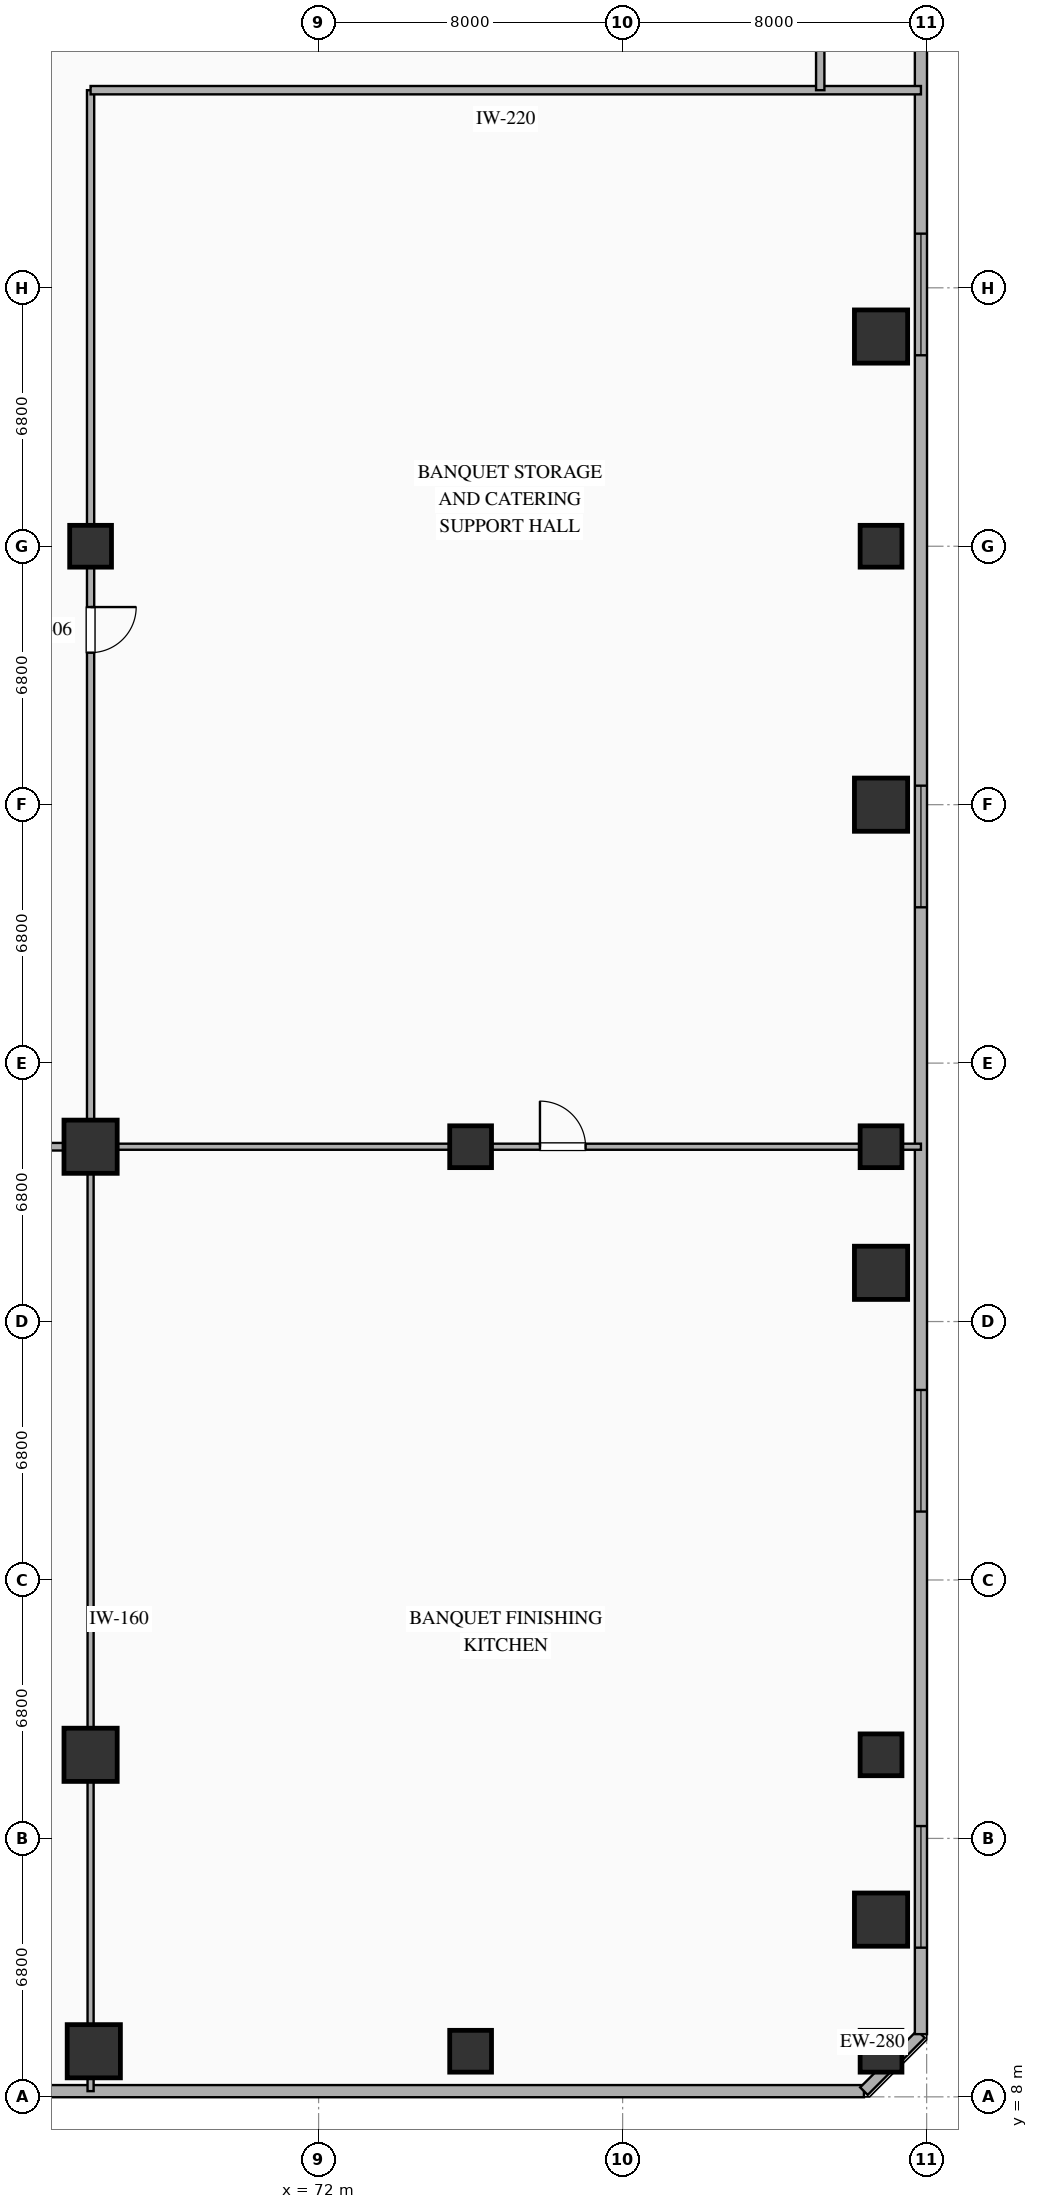
"""IFC4 building model, lengths in metres.
Left out: names, types, materials, properties, quantities, classifications, styles, units other than length and angle.
Written with IfcOpenShell. Run it as: python <this file> out.ifc"""

import sys

from ifc_helpers import new_model, si_unit, direction, frame, frame_2d, origin, origin_2d, place, context, subcontext, project, spatial, rectangle, extrude, element, fill, save


model = new_model("IFC4")
c1 = context("Model", 3, precision=1e-05, world=origin(), true_north=direction((0.0, 1.0)))
c2 = subcontext(c1, "Body", "Model", "MODEL_VIEW")
j1 = project(units=[si_unit("LENGTHUNIT", "METRE"), si_unit("PLANEANGLEUNIT", "RADIAN")], contexts=[c1])
p1 = place(None, origin())
s1 = spatial("IfcSite", under=j1, at=p1, CompositionType="ELEMENT")
p2 = place(p1, origin())
s2 = spatial("IfcBuilding", under=s1, at=p2, CompositionType="ELEMENT")
p3 = place(p2, frame((0.0, 0.0, 16.8)))
s3 = spatial("IfcBuildingStorey", under=s2, at=p3, CompositionType="ELEMENT", Elevation=16.8)
for number, where, z_axis, x_axis in (
    (1, (76.0, 9.2, 0.0), (0.0, 0.0, 1.0), (1.0, 0.0, 0.0)),
    (2, (86.8, 9.2, 0.0), (0.0, 0.0, 1.0), (1.0, 0.0, 0.0)),
    (3, (86.8, 17.0, 0.0), (0.0, 0.0, 1.0), (1.0, 0.0, 0.0)),
    (4, (86.8, 33.0, 0.0), (0.0, 0.0, 1.0), (1.0, 0.0, 0.0)),
    (5, (86.8, 48.8, 0.0), (0.0, 0.0, 1.0), (1.0, 0.0, 0.0)),
):
    element("IfcColumn", number, at=place(p3, frame(where, z_axis=z_axis, x_axis=x_axis)), inside=s3, PredefinedType="COLUMN", context=c2, shape_type="SweptSolid", body=[
        extrude(rectangle(XDim=1.1, YDim=1.1, at=origin_2d()), origin(), (0.0, 0.0, 1.0), 5.05),
    ])
for number, where, z_axis, x_axis in (
    (6, (66.0, 17.0, 0.0), (0.0, 0.0, 1.0), (1.0, 0.0, 0.0)),
    (7, (66.0, 33.0, 0.0), (0.0, 0.0, 1.0), (1.0, 0.0, 0.0)),
):
    element("IfcColumn", number, at=place(p3, frame(where, z_axis=z_axis, x_axis=x_axis)), inside=s3, PredefinedType="COLUMN", context=c2, shape_type="SweptSolid", body=[
        extrude(rectangle(XDim=1.4, YDim=1.4, at=origin_2d()), origin(), (0.0, 0.0, 1.0), 5.05),
    ])
for number, where, z_axis, x_axis in (
    (8, (76.0, 33.0, 0.0), (0.0, 0.0, 1.0), (1.0, 0.0, 0.0)),
    (9, (66.0, 48.8, 0.0), (0.0, 0.0, 1.0), (1.0, 0.0, 0.0)),
):
    element("IfcColumn", number, at=place(p3, frame(where, z_axis=z_axis, x_axis=x_axis)), inside=s3, PredefinedType="COLUMN", context=c2, shape_type="SweptSolid", body=[
        extrude(rectangle(XDim=1.1, YDim=1.1, at=origin_2d()), origin(), (0.0, 0.0, 1.0), 5.05),
    ])
for number, where, z_axis, x_axis in (
    (10, (86.8, 42.0, 0.0), (0.0, 0.0, 1.0), (1.0, 0.0, 0.0)),
    (11, (86.8, 54.318, 0.0), (0.0, 0.0, 1.0), (1.0, 0.0, 0.0)),
    (12, (66.084, 9.2, 0.0), (0.0, 0.0, 1.0), (1.0, 0.0, 0.0)),
    (13, (86.8, 12.663, 0.0), (0.0, 0.0, 1.0), (1.0, 0.0, 0.0)),
    (14, (86.8, 29.682, 0.0), (0.0, 0.0, 1.0), (1.0, 0.0, 0.0)),
):
    element("IfcColumn", number, at=place(p3, frame(where, z_axis=z_axis, x_axis=x_axis)), inside=s3, PredefinedType="COLUMN", context=c2, shape_type="SweptSolid", body=[
        extrude(rectangle(XDim=1.4, YDim=1.4, at=origin_2d()), origin(), (0.0, 0.0, 1.0), 5.05),
    ])
p4 = place(p3, frame((9.65, 8.15, 0.0), z_axis=(0.0, 0.0, 1.0), x_axis=(1.0, 0.0, 0.0)))
e15 = element("IfcWall", 15, at=p4, inside=s3, PredefinedType="SOLIDWALL", context=c2, shape_type="SweptSolid", body=[
    extrude(rectangle(XDim=76.7, YDim=0.32, at=frame_2d((38.35, 0.0))), origin(), (0.0, 0.0, 1.0), 5.05),
])
p5 = place(p4, frame((3.775, 0.0, 0.9)))
e16 = element("IfcOpeningElement", 16, at=p5, cuts=e15, PredefinedType="OPENING", context=c2, shape_type="SweptSolid", body=[
    extrude(rectangle(XDim=3.2, YDim=3.95, at=frame_2d((1.6, 1.975))), frame((0.0, 0.17, 0.0), z_axis=(0.0, -1.0, 0.0), x_axis=(1.0, 0.0, 0.0)), (0.0, 0.0, 1.0), 0.34),
])
p6 = place(p4, frame((13.75, 0.0, 0.9)))
e17 = element("IfcOpeningElement", 17, at=p6, cuts=e15, PredefinedType="OPENING", context=c2, shape_type="SweptSolid", body=[
    extrude(rectangle(XDim=3.2, YDim=3.95, at=frame_2d((1.6, 1.975))), frame((0.0, 0.17, 0.0), z_axis=(0.0, -1.0, 0.0), x_axis=(1.0, 0.0, 0.0)), (0.0, 0.0, 1.0), 0.34),
])
p7 = place(p4, frame((24.75, 0.0, 0.9)))
e18 = element("IfcOpeningElement", 18, at=p7, cuts=e15, PredefinedType="OPENING", context=c2, shape_type="SweptSolid", body=[
    extrude(rectangle(XDim=3.2, YDim=3.95, at=frame_2d((1.6, 1.975))), frame((0.0, 0.17, 0.0), z_axis=(0.0, -1.0, 0.0), x_axis=(1.0, 0.0, 0.0)), (0.0, 0.0, 1.0), 0.34),
])
p8 = place(p4, frame((36.75, 0.0, 0.9)))
e19 = element("IfcOpeningElement", 19, at=p8, cuts=e15, PredefinedType="OPENING", context=c2, shape_type="SweptSolid", body=[
    extrude(rectangle(XDim=3.2, YDim=3.95, at=frame_2d((1.6, 1.975))), frame((0.0, 0.17, 0.0), z_axis=(0.0, -1.0, 0.0), x_axis=(1.0, 0.0, 0.0)), (0.0, 0.0, 1.0), 0.34),
])
p9 = place(p3, frame((86.35, 8.15, 0.0), z_axis=(0.0, 0.0, 1.0), x_axis=(0.707106781187, 0.707106781187, 0.0)))
e20 = element("IfcWall", 20, at=p9, inside=s3, PredefinedType="SOLIDWALL", context=c2, shape_type="SweptSolid", body=[
    extrude(rectangle(XDim=2.121, YDim=0.28, at=frame_2d((1.061, 0.0))), origin(), (0.0, 0.0, 1.0), 5.05),
])
p10 = place(p3, frame((87.85, 9.65, 0.0), z_axis=(0.0, 0.0, 1.0), x_axis=(0.0, 1.0, 0.0)))
e21 = element("IfcWall", 21, at=p10, inside=s3, PredefinedType="SOLIDWALL", context=c2, shape_type="SweptSolid", body=[
    extrude(rectangle(XDim=64.7, YDim=0.32, at=frame_2d((32.35, 0.0))), origin(), (0.0, 0.0, 1.0), 5.05),
])
p11 = place(p10, frame((2.275, 0.0, 0.9)))
e22 = element("IfcOpeningElement", 22, at=p11, cuts=e21, PredefinedType="OPENING", context=c2, shape_type="SweptSolid", body=[
    extrude(rectangle(XDim=3.2, YDim=3.95, at=frame_2d((1.6, 1.975))), frame((0.0, 0.17, 0.0), z_axis=(0.0, -1.0, 0.0), x_axis=(1.0, 0.0, 0.0)), (0.0, 0.0, 1.0), 0.34),
])
p12 = place(p10, frame((13.75, 0.0, 0.9)))
e23 = element("IfcOpeningElement", 23, at=p12, cuts=e21, PredefinedType="OPENING", context=c2, shape_type="SweptSolid", body=[
    extrude(rectangle(XDim=3.2, YDim=3.95, at=frame_2d((1.6, 1.975))), frame((0.0, 0.17, 0.0), z_axis=(0.0, -1.0, 0.0), x_axis=(1.0, 0.0, 0.0)), (0.0, 0.0, 1.0), 0.34),
])
p13 = place(p10, frame((29.65, 0.0, 0.9)))
e24 = element("IfcOpeningElement", 24, at=p13, cuts=e21, PredefinedType="OPENING", context=c2, shape_type="SweptSolid", body=[
    extrude(rectangle(XDim=3.2, YDim=3.95, at=frame_2d((1.6, 1.975))), frame((0.0, 0.17, 0.0), z_axis=(0.0, -1.0, 0.0), x_axis=(1.0, 0.0, 0.0)), (0.0, 0.0, 1.0), 0.34),
])
p14 = place(p10, frame((44.175, 0.0, 0.9)))
e25 = element("IfcOpeningElement", 25, at=p14, cuts=e21, PredefinedType="OPENING", context=c2, shape_type="SweptSolid", body=[
    extrude(rectangle(XDim=3.2, YDim=3.95, at=frame_2d((1.6, 1.975))), frame((0.0, 0.17, 0.0), z_axis=(0.0, -1.0, 0.0), x_axis=(1.0, 0.0, 0.0)), (0.0, 0.0, 1.0), 0.34),
])
p15 = place(p3, frame((66.0, 33.0, 0.0), z_axis=(0.0, 0.0, 1.0), x_axis=(-1.0, 0.0, 0.0)))
e26 = element("IfcWall", 26, at=p15, inside=s3, PredefinedType="PARTITIONING", context=c2, shape_type="SweptSolid", body=[
    extrude(rectangle(XDim=57.85, YDim=0.2, at=frame_2d((28.925, 0.0))), origin(), (0.0, 0.0, 1.0), 3.65),
])
p16 = place(p15, frame((17.416, 0.0, 0.0)))
e27 = element("IfcOpeningElement", 27, at=p16, cuts=e26, PredefinedType="OPENING", context=c2, shape_type="SweptSolid", body=[
    extrude(rectangle(XDim=1.2, YDim=2.25, at=frame_2d((0.6, 1.125))), frame((0.0, 0.11, 0.0), z_axis=(0.0, -1.0, 0.0), x_axis=(1.0, 0.0, 0.0)), (0.0, 0.0, 1.0), 0.22),
])
p17 = place(p15, frame((41.684, 0.0, 0.0)))
e28 = element("IfcOpeningElement", 28, at=p17, cuts=e26, PredefinedType="OPENING", context=c2, shape_type="SweptSolid", body=[
    extrude(rectangle(XDim=1.8, YDim=2.2, at=frame_2d((0.9, 1.1))), frame((0.0, 0.11, 0.0), z_axis=(0.0, -1.0, 0.0), x_axis=(1.0, 0.0, 0.0)), (0.0, 0.0, 1.0), 0.22),
])
p18 = place(p3, frame((66.0, 60.8, 0.0), z_axis=(0.0, 0.0, 1.0), x_axis=(0.0, -1.0, 0.0)))
e29 = element("IfcWall", 29, at=p18, inside=s3, PredefinedType="PARTITIONING", context=c2, shape_type="SweptSolid", body=[
    extrude(rectangle(XDim=27.8, YDim=0.19, at=frame_2d((13.9, 0.0))), origin(), (0.0, 0.0, 1.0), 3.65),
])
p19 = place(p18, frame((13.6, 0.0, 0.0)))
e30 = element("IfcOpeningElement", 30, at=p19, cuts=e29, PredefinedType="OPENING", context=c2, shape_type="SweptSolid", body=[
    extrude(rectangle(XDim=1.2, YDim=2.25, at=frame_2d((0.6, 1.125))), frame((0.0, 0.105, 0.0), z_axis=(0.0, -1.0, 0.0), x_axis=(1.0, 0.0, 0.0)), (0.0, 0.0, 1.0), 0.21),
])
p20 = place(p3, frame((66.0, 33.0, 0.0), z_axis=(0.0, 0.0, 1.0), x_axis=(0.0, -1.0, 0.0)))
e31 = element("IfcWall", 31, at=p20, inside=s3, PredefinedType="PLUMBINGWALL", context=c2, shape_type="SweptSolid", body=[
    extrude(rectangle(XDim=24.85, YDim=0.16, at=frame_2d((12.425, 0.0))), origin(), (0.0, 0.0, 1.0), 3.65),
])
p21 = place(p3, frame((66.0, 33.0, 0.0), z_axis=(0.0, 0.0, 1.0), x_axis=(1.0, 0.0, 0.0)))
e32 = element("IfcWall", 32, at=p21, inside=s3, PredefinedType="PLUMBINGWALL", context=c2, shape_type="SweptSolid", body=[
    extrude(rectangle(XDim=21.85, YDim=0.16, at=frame_2d((10.925, 0.0))), origin(), (0.0, 0.0, 1.0), 3.65),
])
p22 = place(p21, frame((11.825, 0.0, 0.0)))
e33 = element("IfcOpeningElement", 33, at=p22, cuts=e32, PredefinedType="OPENING", context=c2, shape_type="SweptSolid", body=[
    extrude(rectangle(XDim=1.2, YDim=2.25, at=frame_2d((0.6, 1.125))), frame((0.0, 0.09, 0.0), z_axis=(0.0, -1.0, 0.0), x_axis=(1.0, 0.0, 0.0)), (0.0, 0.0, 1.0), 0.18),
])
p23 = place(p3, frame((87.85, 60.8, 0.0), z_axis=(0.0, 0.0, 1.0), x_axis=(-1.0, 0.0, 0.0)))
e34 = element("IfcWall", 34, at=p23, inside=s3, PredefinedType="SOLIDWALL", context=c2, shape_type="SweptSolid", body=[
    extrude(rectangle(XDim=21.85, YDim=0.22, at=frame_2d((10.925, 0.0))), origin(), (0.0, 0.0, 1.0), 3.65),
])
p24 = place(p3, frame((85.2, 63.85, 0.0), z_axis=(0.0, 0.0, 1.0), x_axis=(0.0, -1.0, 0.0)))
e35 = element("IfcWall", 35, at=p24, inside=s3, PredefinedType="SOLIDWALL", context=c2, shape_type="SweptSolid", body=[
    extrude(rectangle(XDim=3.05, YDim=0.22, at=frame_2d((1.525, 0.0))), origin(), (0.0, 0.0, 1.0), 3.65),
])
p25 = place(p24, frame((1.1, 0.0, 0.0)))
e36 = element("IfcOpeningElement", 36, at=p25, cuts=e35, PredefinedType="OPENING", context=c2, shape_type="SweptSolid", body=[
    extrude(rectangle(XDim=0.85, YDim=2.15, at=frame_2d((0.425, 1.075))), frame((0.0, 0.12, 0.0), z_axis=(0.0, -1.0, 0.0), x_axis=(1.0, 0.0, 0.0)), (0.0, 0.0, 1.0), 0.24),
])
p26 = place(p11, origin())
e37 = element("IfcWindow", 37, at=p26, inside=s3, PartitioningType="SINGLE_PANEL", PredefinedType="WINDOW", context=c2, shape_type="SweptSolid", body=[
    extrude(rectangle(XDim=3.2, YDim=3.95, at=frame_2d((1.6, 1.975))), frame((0.0, 0.03, 0.0), z_axis=(0.0, -1.0, 0.0), x_axis=(1.0, 0.0, 0.0)), (0.0, 0.0, 1.0), 0.06),
])
fill(e22, e37)
p27 = place(p12, origin())
e38 = element("IfcWindow", 38, at=p27, inside=s3, PartitioningType="SINGLE_PANEL", PredefinedType="WINDOW", context=c2, shape_type="SweptSolid", body=[
    extrude(rectangle(XDim=3.2, YDim=3.95, at=frame_2d((1.6, 1.975))), frame((0.0, 0.03, 0.0), z_axis=(0.0, -1.0, 0.0), x_axis=(1.0, 0.0, 0.0)), (0.0, 0.0, 1.0), 0.06),
])
fill(e23, e38)
p28 = place(p13, origin())
e39 = element("IfcWindow", 39, at=p28, inside=s3, PartitioningType="SINGLE_PANEL", PredefinedType="WINDOW", context=c2, shape_type="SweptSolid", body=[
    extrude(rectangle(XDim=3.2, YDim=3.95, at=frame_2d((1.6, 1.975))), frame((0.0, 0.03, 0.0), z_axis=(0.0, -1.0, 0.0), x_axis=(1.0, 0.0, 0.0)), (0.0, 0.0, 1.0), 0.06),
])
fill(e24, e39)
p29 = place(p14, origin())
e40 = element("IfcWindow", 40, at=p29, inside=s3, PartitioningType="SINGLE_PANEL", PredefinedType="WINDOW", context=c2, shape_type="SweptSolid", body=[
    extrude(rectangle(XDim=3.2, YDim=3.95, at=frame_2d((1.6, 1.975))), frame((0.0, 0.03, 0.0), z_axis=(0.0, -1.0, 0.0), x_axis=(1.0, 0.0, 0.0)), (0.0, 0.0, 1.0), 0.06),
])
fill(e25, e40)
p30 = place(p19, origin())
e41 = element("IfcDoor", 41, at=p30, inside=s3, OperationType="SINGLE_SWING_LEFT", PredefinedType="DOOR", context=c2, shape_type="SweptSolid", body=[
    extrude(rectangle(XDim=1.2, YDim=2.25, at=frame_2d((0.6, 1.125))), frame((0.0, 0.025, 0.0), z_axis=(0.0, -1.0, 0.0), x_axis=(1.0, 0.0, 0.0)), (0.0, 0.0, 1.0), 0.05),
])
fill(e30, e41)
p31 = place(p22, origin())
e42 = element("IfcDoor", 42, at=p31, inside=s3, OperationType="SINGLE_SWING_LEFT", PredefinedType="DOOR", context=c2, shape_type="SweptSolid", body=[
    extrude(rectangle(XDim=1.2, YDim=2.25, at=frame_2d((0.6, 1.125))), frame((0.0, 0.025, 0.0), z_axis=(0.0, -1.0, 0.0), x_axis=(1.0, 0.0, 0.0)), (0.0, 0.0, 1.0), 0.05),
])
fill(e33, e42)
save(model, sys.argv[1])
